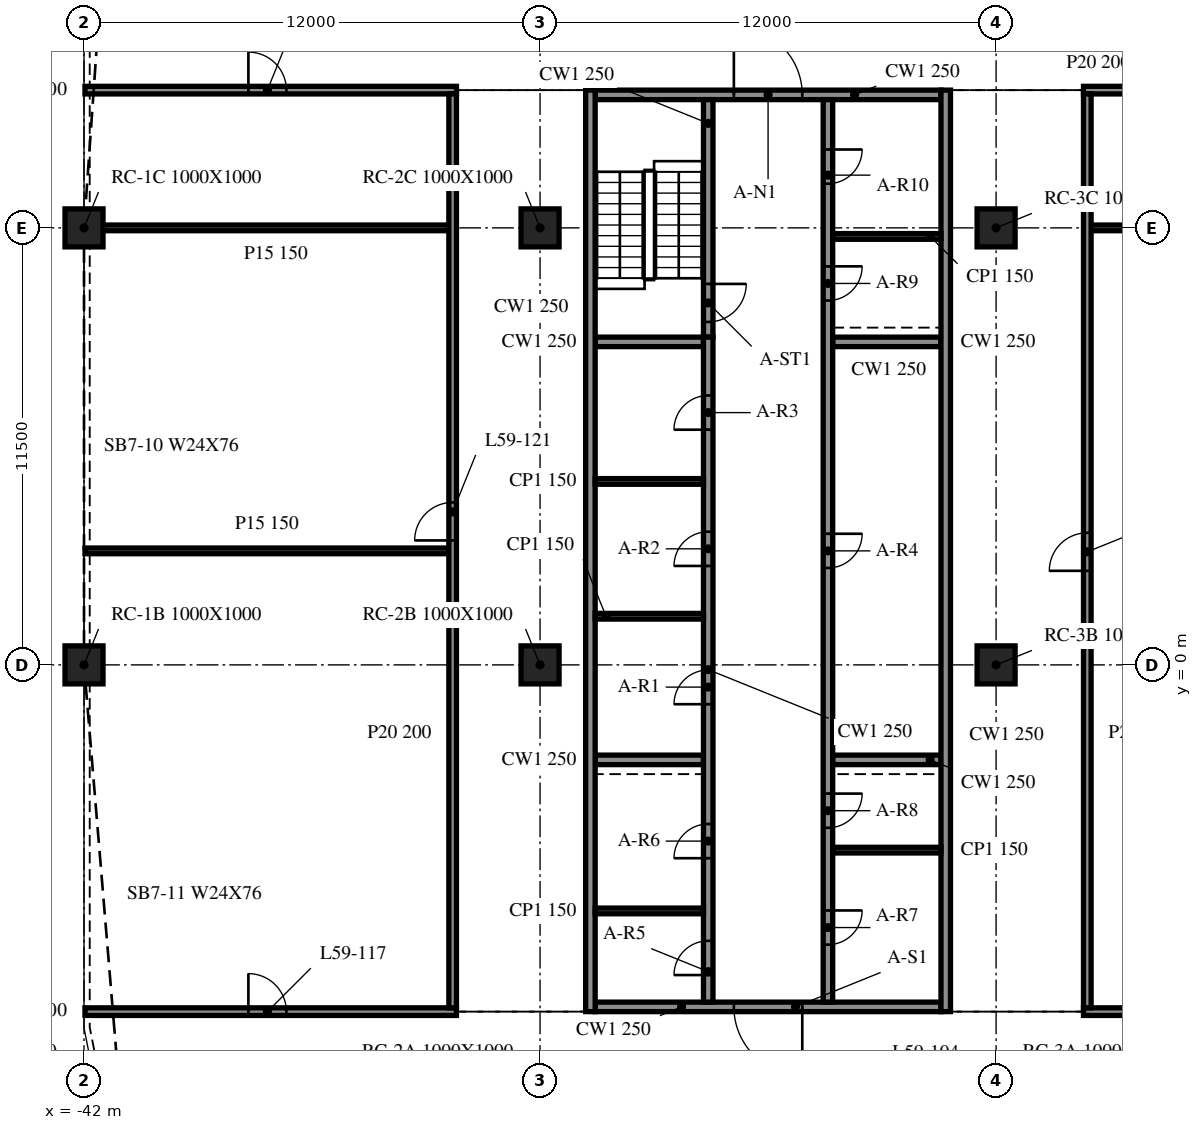
"""IFC4 building model, lengths in metres.
Left out: names, types, materials, properties, quantities, classifications, styles, units other than length and angle.
Written with IfcOpenShell. Run it as: python <this file> out.ifc"""

import sys

from ifc_helpers import new_model, si_unit, direction, frame, frame_2d, origin, origin_2d, place, context, subcontext, project, spatial, rectangle, extrude, element, fill, save


model = new_model("IFC4")
c1 = context("Model", 3, precision=1e-05, world=origin(), true_north=direction((0.0, 1.0)))
c2 = subcontext(c1, "Body", "Model", "MODEL_VIEW")
j1 = project(units=[si_unit("LENGTHUNIT", "METRE"), si_unit("PLANEANGLEUNIT", "RADIAN")], contexts=[c1])
p1 = place(None, origin())
s1 = spatial("IfcSite", under=j1, at=p1, CompositionType="ELEMENT")
p2 = place(p1, origin())
s2 = spatial("IfcBuilding", under=s1, at=p2, CompositionType="ELEMENT")
p3 = place(p2, frame((0.0, 0.0, 243.8)))
s3 = spatial("IfcBuildingStorey", under=s2, at=p3, CompositionType="ELEMENT", Elevation=243.8)
for number, where, z_axis, x_axis in (
    (1, (-42.0, 0.0, -0.34), (0.0, 0.0, 1.0), (1.0, 0.0, 0.0)),
    (2, (-42.0, 11.5, -0.34), (0.0, 0.0, 1.0), (1.0, 0.0, 0.0)),
    (3, (-30.0, 0.0, -0.34), (0.0, 0.0, 1.0), (1.0, 0.0, 0.0)),
    (4, (-30.0, 11.5, -0.34), (0.0, 0.0, 1.0), (1.0, 0.0, 0.0)),
    (5, (-18.0, 0.0, -0.34), (0.0, 0.0, 1.0), (1.0, 0.0, 0.0)),
    (6, (-18.0, 11.5, -0.34), (0.0, 0.0, 1.0), (1.0, 0.0, 0.0)),
):
    element("IfcColumn", number, at=place(p3, frame(where, z_axis=z_axis, x_axis=x_axis)), inside=s3, PredefinedType="COLUMN", context=c2, shape_type="SweptSolid", body=[
        extrude(rectangle(XDim=1.0, YDim=1.0, at=origin_2d()), origin(), (0.0, 0.0, 1.0), 3.8),
    ])
for number, where, z_axis, x_axis in (
    (7, (-28.675, 15.125, 0.0), (0.0, 0.0, 1.0), (0.0, -1.0, 0.0)),
    (8, (-19.325, -9.125, 0.0), (0.0, 0.0, 1.0), (0.0, 1.0, 0.0)),
):
    element("IfcWall", number, at=place(p3, frame(where, z_axis=z_axis, x_axis=x_axis)), inside=s3, PredefinedType="SOLIDWALL", context=c2, shape_type="SweptSolid", body=[
        extrude(rectangle(XDim=24.25, YDim=0.25, at=frame_2d((12.125, 0.0))), origin(), (0.0, 0.0, 1.0), 3.46),
    ])
p4 = place(p3, frame((-19.45, -9.0, 0.0), z_axis=(0.0, 0.0, 1.0), x_axis=(-1.0, 0.0, 0.0)))
e9 = element("IfcWall", 9, at=p4, inside=s3, PredefinedType="SOLIDWALL", context=c2, shape_type="SweptSolid", body=[
    extrude(rectangle(XDim=9.1, YDim=0.25, at=frame_2d((4.55, 0.0))), origin(), (0.0, 0.0, 1.0), 3.46),
])
p5 = place(p4, frame((3.65, 0.0, 0.0)))
e10 = element("IfcOpeningElement", 10, at=p5, cuts=e9, PredefinedType="OPENING", context=c2, shape_type="SweptSolid", body=[
    extrude(rectangle(XDim=1.8, YDim=2.1, at=frame_2d((0.9, 1.05))), frame((0.0, 0.135, 0.0), z_axis=(0.0, -1.0, 0.0), x_axis=(1.0, 0.0, 0.0)), (0.0, 0.0, 1.0), 0.27),
])
p6 = place(p3, frame((-28.55, 15.0, 0.0), z_axis=(0.0, 0.0, 1.0), x_axis=(1.0, 0.0, 0.0)))
e11 = element("IfcWall", 11, at=p6, inside=s3, PredefinedType="SOLIDWALL", context=c2, shape_type="SweptSolid", body=[
    extrude(rectangle(XDim=9.1, YDim=0.25, at=frame_2d((4.55, 0.0))), origin(), (0.0, 0.0, 1.0), 3.46),
])
p7 = place(p6, frame((3.65, 0.0, 0.0)))
e12 = element("IfcOpeningElement", 12, at=p7, cuts=e11, PredefinedType="OPENING", context=c2, shape_type="SweptSolid", body=[
    extrude(rectangle(XDim=1.8, YDim=2.1, at=frame_2d((0.9, 1.05))), frame((0.0, 0.135, 0.0), z_axis=(0.0, -1.0, 0.0), x_axis=(1.0, 0.0, 0.0)), (0.0, 0.0, 1.0), 0.27),
])
p8 = place(p3, frame((-25.575, -8.875, 0.0), z_axis=(0.0, 0.0, 1.0), x_axis=(0.0, 1.0, 0.0)))
e13 = element("IfcWall", 13, at=p8, inside=s3, PredefinedType="SOLIDWALL", context=c2, shape_type="SweptSolid", body=[
    extrude(rectangle(XDim=17.5, YDim=0.25, at=frame_2d((8.75, 0.0))), origin(), (0.0, 0.0, 1.0), 3.46),
])
p9 = place(p8, frame((7.84, 0.0, 0.0)))
e14 = element("IfcOpeningElement", 14, at=p9, cuts=e13, PredefinedType="OPENING", context=c2, shape_type="SweptSolid", body=[
    extrude(rectangle(XDim=0.9, YDim=2.1, at=frame_2d((0.45, 1.05))), frame((0.0, 0.135, 0.0), z_axis=(0.0, -1.0, 0.0), x_axis=(1.0, 0.0, 0.0)), (0.0, 0.0, 1.0), 0.27),
])
p10 = place(p8, frame((11.479, 0.0, 0.0)))
e15 = element("IfcOpeningElement", 15, at=p10, cuts=e13, PredefinedType="OPENING", context=c2, shape_type="SweptSolid", body=[
    extrude(rectangle(XDim=0.9, YDim=2.1, at=frame_2d((0.45, 1.05))), frame((0.0, 0.135, 0.0), z_axis=(0.0, -1.0, 0.0), x_axis=(1.0, 0.0, 0.0)), (0.0, 0.0, 1.0), 0.27),
])
p11 = place(p8, frame((15.064, 0.0, 0.0)))
e16 = element("IfcOpeningElement", 16, at=p11, cuts=e13, PredefinedType="OPENING", context=c2, shape_type="SweptSolid", body=[
    extrude(rectangle(XDim=0.9, YDim=2.1, at=frame_2d((0.45, 1.05))), frame((0.0, 0.135, 0.0), z_axis=(0.0, -1.0, 0.0), x_axis=(1.0, 0.0, 0.0)), (0.0, 0.0, 1.0), 0.27),
])
p12 = place(p8, frame((0.712, 0.0, 0.0)))
e17 = element("IfcOpeningElement", 17, at=p12, cuts=e13, PredefinedType="OPENING", context=c2, shape_type="SweptSolid", body=[
    extrude(rectangle(XDim=0.9, YDim=2.1, at=frame_2d((0.45, 1.05))), frame((0.0, 0.135, 0.0), z_axis=(0.0, -1.0, 0.0), x_axis=(1.0, 0.0, 0.0)), (0.0, 0.0, 1.0), 0.27),
])
p13 = place(p8, frame((3.788, 0.0, 0.0)))
e18 = element("IfcOpeningElement", 18, at=p13, cuts=e13, PredefinedType="OPENING", context=c2, shape_type="SweptSolid", body=[
    extrude(rectangle(XDim=0.9, YDim=2.1, at=frame_2d((0.45, 1.05))), frame((0.0, 0.135, 0.0), z_axis=(0.0, -1.0, 0.0), x_axis=(1.0, 0.0, 0.0)), (0.0, 0.0, 1.0), 0.27),
])
p14 = place(p3, frame((-25.575, 14.875, 0.0), z_axis=(0.0, 0.0, 1.0), x_axis=(0.0, -1.0, 0.0)))
e19 = element("IfcWall", 19, at=p14, inside=s3, PredefinedType="SOLIDWALL", context=c2, shape_type="SweptSolid", body=[
    extrude(rectangle(XDim=6.25, YDim=0.25, at=frame_2d((3.125, 0.0))), origin(), (0.0, 0.0, 1.0), 3.46),
])
p15 = place(p14, frame((4.85, 0.0, 0.0)))
e20 = element("IfcOpeningElement", 20, at=p15, cuts=e19, PredefinedType="OPENING", context=c2, shape_type="SweptSolid", body=[
    extrude(rectangle(XDim=1.0, YDim=2.1, at=frame_2d((0.5, 1.05))), frame((0.0, 0.135, 0.0), z_axis=(0.0, -1.0, 0.0), x_axis=(1.0, 0.0, 0.0)), (0.0, 0.0, 1.0), 0.27),
])
p16 = place(p3, frame((-22.425, 14.875, 0.0), z_axis=(0.0, 0.0, 1.0), x_axis=(0.0, -1.0, 0.0)))
e21 = element("IfcWall", 21, at=p16, inside=s3, PredefinedType="SOLIDWALL", context=c2, shape_type="SweptSolid", body=[
    extrude(rectangle(XDim=23.75, YDim=0.25, at=frame_2d((11.875, 0.0))), origin(), (0.0, 0.0, 1.0), 3.46),
])
p17 = place(p16, frame((11.425, 0.0, 0.0)))
e22 = element("IfcOpeningElement", 22, at=p17, cuts=e21, PredefinedType="OPENING", context=c2, shape_type="SweptSolid", body=[
    extrude(rectangle(XDim=0.9, YDim=2.1, at=frame_2d((0.45, 1.05))), frame((0.0, 0.135, 0.0), z_axis=(0.0, -1.0, 0.0), x_axis=(1.0, 0.0, 0.0)), (0.0, 0.0, 1.0), 0.27),
])
p18 = place(p16, frame((21.337, 0.0, 0.0)))
e23 = element("IfcOpeningElement", 23, at=p18, cuts=e21, PredefinedType="OPENING", context=c2, shape_type="SweptSolid", body=[
    extrude(rectangle(XDim=0.9, YDim=2.1, at=frame_2d((0.45, 1.05))), frame((0.0, 0.135, 0.0), z_axis=(0.0, -1.0, 0.0), x_axis=(1.0, 0.0, 0.0)), (0.0, 0.0, 1.0), 0.27),
])
p19 = place(p16, frame((18.262, 0.0, 0.0)))
e24 = element("IfcOpeningElement", 24, at=p19, cuts=e21, PredefinedType="OPENING", context=c2, shape_type="SweptSolid", body=[
    extrude(rectangle(XDim=0.9, YDim=2.1, at=frame_2d((0.45, 1.05))), frame((0.0, 0.135, 0.0), z_axis=(0.0, -1.0, 0.0), x_axis=(1.0, 0.0, 0.0)), (0.0, 0.0, 1.0), 0.27),
])
p20 = place(p16, frame((4.387, 0.0, 0.0)))
e25 = element("IfcOpeningElement", 25, at=p20, cuts=e21, PredefinedType="OPENING", context=c2, shape_type="SweptSolid", body=[
    extrude(rectangle(XDim=0.9, YDim=2.1, at=frame_2d((0.45, 1.05))), frame((0.0, 0.135, 0.0), z_axis=(0.0, -1.0, 0.0), x_axis=(1.0, 0.0, 0.0)), (0.0, 0.0, 1.0), 0.27),
])
p21 = place(p16, frame((1.312, 0.0, 0.0)))
e26 = element("IfcOpeningElement", 26, at=p21, cuts=e21, PredefinedType="OPENING", context=c2, shape_type="SweptSolid", body=[
    extrude(rectangle(XDim=0.9, YDim=2.1, at=frame_2d((0.45, 1.05))), frame((0.0, 0.135, 0.0), z_axis=(0.0, -1.0, 0.0), x_axis=(1.0, 0.0, 0.0)), (0.0, 0.0, 1.0), 0.27),
])
for number, where, z_axis, x_axis in (
    (27, (-28.55, -2.5, 0.0), (0.0, 0.0, 1.0), (1.0, 0.0, 0.0)),
    (28, (-28.55, 8.5, 0.0), (0.0, 0.0, 1.0), (1.0, 0.0, 0.0)),
    (29, (-22.3, -2.5, 0.0), (0.0, 0.0, 1.0), (1.0, 0.0, 0.0)),
    (30, (-22.3, 8.5, 0.0), (0.0, 0.0, 1.0), (1.0, 0.0, 0.0)),
):
    element("IfcWall", number, at=place(p3, frame(where, z_axis=z_axis, x_axis=x_axis)), inside=s3, PredefinedType="SOLIDWALL", context=c2, shape_type="SweptSolid", body=[
        extrude(rectangle(XDim=2.85, YDim=0.25, at=frame_2d((1.425, 0.0))), origin(), (0.0, 0.0, 1.0), 3.46),
    ])
for number, where, z_axis, x_axis in (
    (31, (-28.55, 1.28, 0.0), (0.0, 0.0, 1.0), (1.0, 0.0, 0.0)),
    (32, (-28.55, 4.827, 0.0), (0.0, 0.0, 1.0), (1.0, 0.0, 0.0)),
    (33, (-28.55, -6.475, 0.0), (0.0, 0.0, 1.0), (1.0, 0.0, 0.0)),
    (34, (-22.3, -4.875, 0.0), (0.0, 0.0, 1.0), (1.0, 0.0, 0.0)),
    (35, (-22.3, 11.275, 0.0), (0.0, 0.0, 1.0), (1.0, 0.0, 0.0)),
):
    element("IfcWall", number, at=place(p3, frame(where, z_axis=z_axis, x_axis=x_axis)), inside=s3, PredefinedType="PARTITIONING", context=c2, shape_type="SweptSolid", body=[
        extrude(rectangle(XDim=2.85, YDim=0.15, at=frame_2d((1.425, 0.0))), origin(), (0.0, 0.0, 1.0), 3.46),
    ])
p22 = place(p3, frame((-41.975, -9.125, 0.0), z_axis=(0.0, 0.0, 1.0), x_axis=(1.0, 0.0, 0.0)))
e36 = element("IfcWall", 36, at=p22, inside=s3, PredefinedType="PARTITIONING", context=c2, shape_type="SweptSolid", body=[
    extrude(rectangle(XDim=9.775, YDim=0.2, at=frame_2d((4.888, 0.0))), origin(), (0.0, 0.0, 1.0), 3.46),
])
p23 = place(p22, frame((4.3, 0.0, 0.0)))
e37 = element("IfcOpeningElement", 37, at=p23, cuts=e36, PredefinedType="OPENING", context=c2, shape_type="SweptSolid", body=[
    extrude(rectangle(XDim=1.0, YDim=2.1, at=frame_2d((0.5, 1.05))), frame((0.0, 0.11, 0.0), z_axis=(0.0, -1.0, 0.0), x_axis=(1.0, 0.0, 0.0)), (0.0, 0.0, 1.0), 0.22),
])
p24 = place(p3, frame((-15.7, -9.125, 0.0), z_axis=(0.0, 0.0, 1.0), x_axis=(1.0, 0.0, 0.0)))
e38 = element("IfcWall", 38, at=p24, inside=s3, PredefinedType="PARTITIONING", context=c2, shape_type="SweptSolid", body=[
    extrude(rectangle(XDim=7.3, YDim=0.2, at=frame_2d((3.65, 0.0))), origin(), (0.0, 0.0, 1.0), 3.46),
])
p25 = place(p3, frame((-41.975, 3.0, 0.0), z_axis=(0.0, 0.0, 1.0), x_axis=(1.0, 0.0, 0.0)))
e39 = element("IfcWall", 39, at=p25, inside=s3, PredefinedType="PARTITIONING", context=c2, shape_type="SweptSolid", body=[
    extrude(rectangle(XDim=9.575, YDim=0.15, at=frame_2d((4.788, 0.0))), origin(), (0.0, 0.0, 1.0), 3.46),
])
p26 = place(p3, frame((-41.5, 11.5, 0.0), z_axis=(0.0, 0.0, 1.0), x_axis=(1.0, 0.0, 0.0)))
e40 = element("IfcWall", 40, at=p26, inside=s3, PredefinedType="PARTITIONING", context=c2, shape_type="SweptSolid", body=[
    extrude(rectangle(XDim=9.1, YDim=0.15, at=frame_2d((4.55, 0.0))), origin(), (0.0, 0.0, 1.0), 3.46),
])
p27 = place(p3, frame((-15.5, 11.5, 0.0), z_axis=(0.0, 0.0, 1.0), x_axis=(1.0, 0.0, 0.0)))
e41 = element("IfcWall", 41, at=p27, inside=s3, PredefinedType="PARTITIONING", context=c2, shape_type="SweptSolid", body=[
    extrude(rectangle(XDim=6.9, YDim=0.15, at=frame_2d((3.45, 0.0))), origin(), (0.0, 0.0, 1.0), 3.46),
])
p28 = place(p3, frame((-41.975, 15.125, 0.0), z_axis=(0.0, 0.0, 1.0), x_axis=(1.0, 0.0, 0.0)))
e42 = element("IfcWall", 42, at=p28, inside=s3, PredefinedType="PARTITIONING", context=c2, shape_type="SweptSolid", body=[
    extrude(rectangle(XDim=9.775, YDim=0.2, at=frame_2d((4.888, 0.0))), origin(), (0.0, 0.0, 1.0), 3.46),
])
p29 = place(p28, frame((4.3, 0.0, 0.0)))
e43 = element("IfcOpeningElement", 43, at=p29, cuts=e42, PredefinedType="OPENING", context=c2, shape_type="SweptSolid", body=[
    extrude(rectangle(XDim=1.0, YDim=2.1, at=frame_2d((0.5, 1.05))), frame((0.0, 0.11, 0.0), z_axis=(0.0, -1.0, 0.0), x_axis=(1.0, 0.0, 0.0)), (0.0, 0.0, 1.0), 0.22),
])
p30 = place(p3, frame((-15.7, 15.125, 0.0), z_axis=(0.0, 0.0, 1.0), x_axis=(1.0, 0.0, 0.0)))
e44 = element("IfcWall", 44, at=p30, inside=s3, PredefinedType="PARTITIONING", context=c2, shape_type="SweptSolid", body=[
    extrude(rectangle(XDim=7.3, YDim=0.2, at=frame_2d((3.65, 0.0))), origin(), (0.0, 0.0, 1.0), 3.46),
])
p31 = place(p30, frame((3.1, 0.0, 0.0)))
e45 = element("IfcOpeningElement", 45, at=p31, cuts=e44, PredefinedType="OPENING", context=c2, shape_type="SweptSolid", body=[
    extrude(rectangle(XDim=0.9, YDim=2.1, at=frame_2d((0.45, 1.05))), frame((0.0, 0.11, 0.0), z_axis=(0.0, -1.0, 0.0), x_axis=(1.0, 0.0, 0.0)), (0.0, 0.0, 1.0), 0.22),
])
p32 = place(p3, frame((-32.3, -9.025, 0.0), z_axis=(0.0, 0.0, 1.0), x_axis=(0.0, 1.0, 0.0)))
e46 = element("IfcWall", 46, at=p32, inside=s3, PredefinedType="PARTITIONING", context=c2, shape_type="SweptSolid", body=[
    extrude(rectangle(XDim=24.05, YDim=0.2, at=frame_2d((12.025, 0.0))), origin(), (0.0, 0.0, 1.0), 3.46),
])
p33 = place(p32, frame((12.3, 0.0, 0.0)))
e47 = element("IfcOpeningElement", 47, at=p33, cuts=e46, PredefinedType="OPENING", context=c2, shape_type="SweptSolid", body=[
    extrude(rectangle(XDim=1.0, YDim=2.1, at=frame_2d((0.5, 1.05))), frame((0.0, 0.11, 0.0), z_axis=(0.0, -1.0, 0.0), x_axis=(1.0, 0.0, 0.0)), (0.0, 0.0, 1.0), 0.22),
])
p34 = place(p3, frame((-15.6, -9.025, 0.0), z_axis=(0.0, 0.0, 1.0), x_axis=(0.0, 1.0, 0.0)))
e48 = element("IfcWall", 48, at=p34, inside=s3, PredefinedType="PARTITIONING", context=c2, shape_type="SweptSolid", body=[
    extrude(rectangle(XDim=24.05, YDim=0.2, at=frame_2d((12.025, 0.0))), origin(), (0.0, 0.0, 1.0), 3.46),
])
p35 = place(p34, frame((11.5, 0.0, 0.0)))
e49 = element("IfcOpeningElement", 49, at=p35, cuts=e48, PredefinedType="OPENING", context=c2, shape_type="SweptSolid", body=[
    extrude(rectangle(XDim=1.0, YDim=2.1, at=frame_2d((0.5, 1.05))), frame((0.0, 0.11, 0.0), z_axis=(0.0, -1.0, 0.0), x_axis=(1.0, 0.0, 0.0)), (0.0, 0.0, 1.0), 0.22),
])
p36 = place(p5, origin())
e50 = element("IfcDoor", 50, at=p36, inside=s3, OperationType="DOUBLE_DOOR_SINGLE_SWING", PredefinedType="DOOR", context=c2, shape_type="SweptSolid", body=[
    extrude(rectangle(XDim=1.8, YDim=2.1, at=frame_2d((0.9, 1.05))), frame((0.0, 0.025, 0.0), z_axis=(0.0, -1.0, 0.0), x_axis=(1.0, 0.0, 0.0)), (0.0, 0.0, 1.0), 0.05),
])
fill(e10, e50)
p37 = place(p7, origin())
e51 = element("IfcDoor", 51, at=p37, inside=s3, OperationType="DOUBLE_DOOR_SINGLE_SWING", PredefinedType="DOOR", context=c2, shape_type="SweptSolid", body=[
    extrude(rectangle(XDim=1.8, YDim=2.1, at=frame_2d((0.9, 1.05))), frame((0.0, 0.025, 0.0), z_axis=(0.0, -1.0, 0.0), x_axis=(1.0, 0.0, 0.0)), (0.0, 0.0, 1.0), 0.05),
])
fill(e12, e51)
p38 = place(p9, origin())
e52 = element("IfcDoor", 52, at=p38, inside=s3, OperationType="SINGLE_SWING_LEFT", PredefinedType="DOOR", context=c2, shape_type="SweptSolid", body=[
    extrude(rectangle(XDim=0.9, YDim=2.1, at=frame_2d((0.45, 1.05))), frame((0.0, 0.025, 0.0), z_axis=(0.0, -1.0, 0.0), x_axis=(1.0, 0.0, 0.0)), (0.0, 0.0, 1.0), 0.05),
])
fill(e14, e52)
p39 = place(p10, origin())
e53 = element("IfcDoor", 53, at=p39, inside=s3, OperationType="SINGLE_SWING_RIGHT", PredefinedType="DOOR", context=c2, shape_type="SweptSolid", body=[
    extrude(rectangle(XDim=0.9, YDim=2.1, at=frame_2d((0.45, 1.05))), frame((0.0, 0.025, 0.0), z_axis=(0.0, -1.0, 0.0), x_axis=(1.0, 0.0, 0.0)), (0.0, 0.0, 1.0), 0.05),
])
fill(e15, e53)
p40 = place(p11, origin())
e54 = element("IfcDoor", 54, at=p40, inside=s3, OperationType="SINGLE_SWING_LEFT", PredefinedType="DOOR", context=c2, shape_type="SweptSolid", body=[
    extrude(rectangle(XDim=0.9, YDim=2.1, at=frame_2d((0.45, 1.05))), frame((0.0, 0.025, 0.0), z_axis=(0.0, -1.0, 0.0), x_axis=(1.0, 0.0, 0.0)), (0.0, 0.0, 1.0), 0.05),
])
fill(e16, e54)
p41 = place(p17, origin())
e55 = element("IfcDoor", 55, at=p41, inside=s3, OperationType="SINGLE_SWING_RIGHT", PredefinedType="DOOR", context=c2, shape_type="SweptSolid", body=[
    extrude(rectangle(XDim=0.9, YDim=2.1, at=frame_2d((0.45, 1.05))), frame((0.0, 0.025, 0.0), z_axis=(0.0, -1.0, 0.0), x_axis=(1.0, 0.0, 0.0)), (0.0, 0.0, 1.0), 0.05),
])
fill(e22, e55)
p42 = place(p12, origin())
e56 = element("IfcDoor", 56, at=p42, inside=s3, OperationType="SINGLE_SWING_LEFT", PredefinedType="DOOR", context=c2, shape_type="SweptSolid", body=[
    extrude(rectangle(XDim=0.9, YDim=2.1, at=frame_2d((0.45, 1.05))), frame((0.0, 0.025, 0.0), z_axis=(0.0, -1.0, 0.0), x_axis=(1.0, 0.0, 0.0)), (0.0, 0.0, 1.0), 0.05),
])
fill(e17, e56)
p43 = place(p13, origin())
e57 = element("IfcDoor", 57, at=p43, inside=s3, OperationType="SINGLE_SWING_RIGHT", PredefinedType="DOOR", context=c2, shape_type="SweptSolid", body=[
    extrude(rectangle(XDim=0.9, YDim=2.1, at=frame_2d((0.45, 1.05))), frame((0.0, 0.025, 0.0), z_axis=(0.0, -1.0, 0.0), x_axis=(1.0, 0.0, 0.0)), (0.0, 0.0, 1.0), 0.05),
])
fill(e18, e57)
p44 = place(p18, origin())
e58 = element("IfcDoor", 58, at=p44, inside=s3, OperationType="SINGLE_SWING_LEFT", PredefinedType="DOOR", context=c2, shape_type="SweptSolid", body=[
    extrude(rectangle(XDim=0.9, YDim=2.1, at=frame_2d((0.45, 1.05))), frame((0.0, 0.025, 0.0), z_axis=(0.0, -1.0, 0.0), x_axis=(1.0, 0.0, 0.0)), (0.0, 0.0, 1.0), 0.05),
])
fill(e23, e58)
p45 = place(p19, origin())
e59 = element("IfcDoor", 59, at=p45, inside=s3, OperationType="SINGLE_SWING_RIGHT", PredefinedType="DOOR", context=c2, shape_type="SweptSolid", body=[
    extrude(rectangle(XDim=0.9, YDim=2.1, at=frame_2d((0.45, 1.05))), frame((0.0, 0.025, 0.0), z_axis=(0.0, -1.0, 0.0), x_axis=(1.0, 0.0, 0.0)), (0.0, 0.0, 1.0), 0.05),
])
fill(e24, e59)
p46 = place(p20, origin())
e60 = element("IfcDoor", 60, at=p46, inside=s3, OperationType="SINGLE_SWING_LEFT", PredefinedType="DOOR", context=c2, shape_type="SweptSolid", body=[
    extrude(rectangle(XDim=0.9, YDim=2.1, at=frame_2d((0.45, 1.05))), frame((0.0, 0.025, 0.0), z_axis=(0.0, -1.0, 0.0), x_axis=(1.0, 0.0, 0.0)), (0.0, 0.0, 1.0), 0.05),
])
fill(e25, e60)
p47 = place(p21, origin())
e61 = element("IfcDoor", 61, at=p47, inside=s3, OperationType="SINGLE_SWING_RIGHT", PredefinedType="DOOR", context=c2, shape_type="SweptSolid", body=[
    extrude(rectangle(XDim=0.9, YDim=2.1, at=frame_2d((0.45, 1.05))), frame((0.0, 0.025, 0.0), z_axis=(0.0, -1.0, 0.0), x_axis=(1.0, 0.0, 0.0)), (0.0, 0.0, 1.0), 0.05),
])
fill(e26, e61)
p48 = place(p15, origin())
e62 = element("IfcDoor", 62, at=p48, inside=s3, OperationType="SINGLE_SWING_LEFT", PredefinedType="DOOR", context=c2, shape_type="SweptSolid", body=[
    extrude(rectangle(XDim=1.0, YDim=2.1, at=frame_2d((0.5, 1.05))), frame((0.0, 0.025, 0.0), z_axis=(0.0, -1.0, 0.0), x_axis=(1.0, 0.0, 0.0)), (0.0, 0.0, 1.0), 0.05),
])
fill(e20, e62)
p49 = place(p23, origin())
e63 = element("IfcDoor", 63, at=p49, inside=s3, OperationType="SINGLE_SWING_LEFT", PredefinedType="DOOR", context=c2, shape_type="SweptSolid", body=[
    extrude(rectangle(XDim=1.0, YDim=2.1, at=frame_2d((0.5, 1.05))), frame((0.0, 0.025, 0.0), z_axis=(0.0, -1.0, 0.0), x_axis=(1.0, 0.0, 0.0)), (0.0, 0.0, 1.0), 0.05),
])
fill(e37, e63)
p50 = place(p35, origin())
e64 = element("IfcDoor", 64, at=p50, inside=s3, OperationType="SINGLE_SWING_RIGHT", PredefinedType="DOOR", context=c2, shape_type="SweptSolid", body=[
    extrude(rectangle(XDim=1.0, YDim=2.1, at=frame_2d((0.5, 1.05))), frame((0.0, 0.025, 0.0), z_axis=(0.0, -1.0, 0.0), x_axis=(1.0, 0.0, 0.0)), (0.0, 0.0, 1.0), 0.05),
])
fill(e49, e64)
p51 = place(p33, origin())
e65 = element("IfcDoor", 65, at=p51, inside=s3, OperationType="SINGLE_SWING_RIGHT", PredefinedType="DOOR", context=c2, shape_type="SweptSolid", body=[
    extrude(rectangle(XDim=1.0, YDim=2.1, at=frame_2d((0.5, 1.05))), frame((0.0, 0.025, 0.0), z_axis=(0.0, -1.0, 0.0), x_axis=(1.0, 0.0, 0.0)), (0.0, 0.0, 1.0), 0.05),
])
fill(e47, e65)
p52 = place(p29, origin())
e66 = element("IfcDoor", 66, at=p52, inside=s3, OperationType="SINGLE_SWING_RIGHT", PredefinedType="DOOR", context=c2, shape_type="SweptSolid", body=[
    extrude(rectangle(XDim=1.0, YDim=2.1, at=frame_2d((0.5, 1.05))), frame((0.0, 0.025, 0.0), z_axis=(0.0, -1.0, 0.0), x_axis=(1.0, 0.0, 0.0)), (0.0, 0.0, 1.0), 0.05),
])
fill(e43, e66)
save(model, sys.argv[1])
